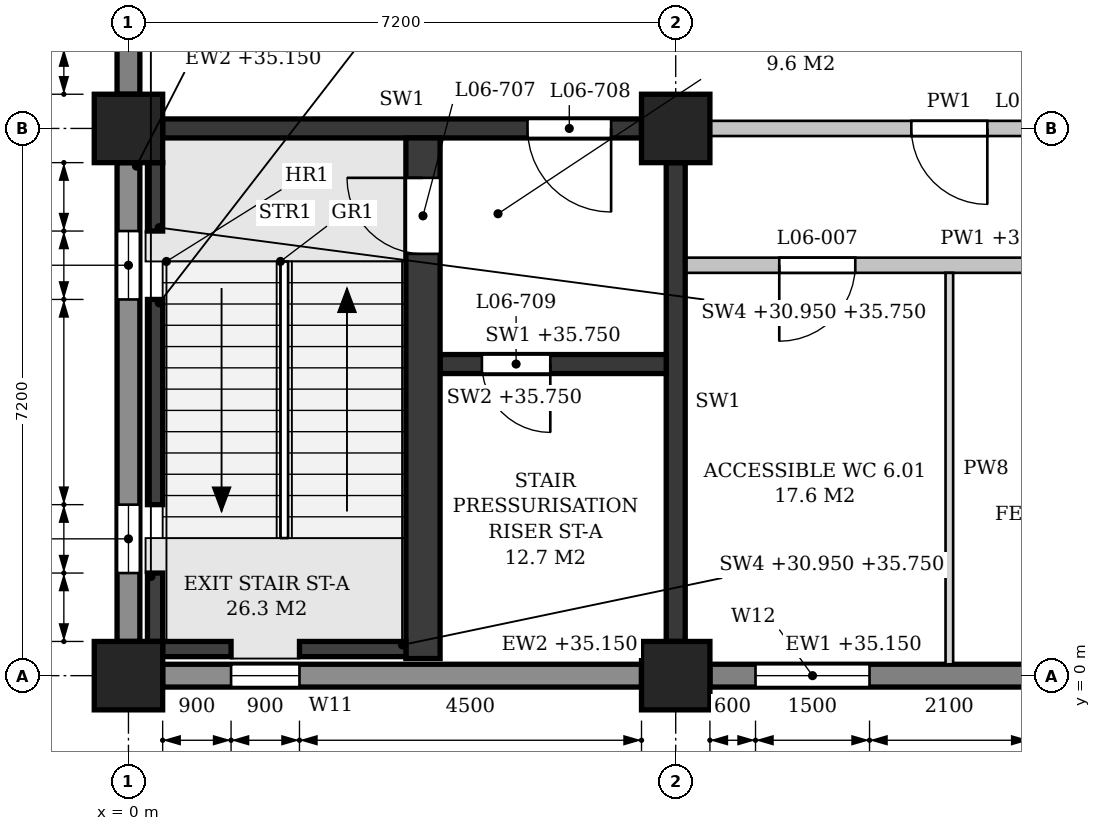
"""IFC4 building model, lengths in metres.
Left out: names, types, materials, properties, quantities, classifications, styles, units other than length and angle.
Written with IfcOpenShell. Run it as: python <this file> out.ifc"""

import sys

from ifc_helpers import new_model, si_unit, direction, frame, frame_2d, origin, origin_2d, place, context, subcontext, project, spatial, polyline, rectangle, outline, extrude, element, fill, save


model = new_model("IFC4")
c1 = context("Model", 3, precision=1e-05, world=origin(), true_north=direction((0.0, 1.0)))
c2 = subcontext(c1, "Body", "Model", "MODEL_VIEW")
j1 = project(units=[si_unit("LENGTHUNIT", "METRE"), si_unit("PLANEANGLEUNIT", "RADIAN")], contexts=[c1])
p1 = place(None, origin())
s1 = spatial("IfcSite", under=j1, at=p1, CompositionType="ELEMENT")
p2 = place(p1, origin())
s2 = spatial("IfcBuilding", under=s1, at=p2, CompositionType="ELEMENT")
p3 = place(p2, frame((0.0, 0.0, 31.2)))
s3 = spatial("IfcBuildingStorey", under=s2, at=p3, CompositionType="ELEMENT", Elevation=31.2)
for number, where, z_axis, x_axis in (
    (1, (0.0, 0.0, 0.0), (0.0, 0.0, 1.0), (1.0, 0.0, 0.0)),
    (2, (0.0, 7.2, 0.0), (0.0, 0.0, 1.0), (1.0, 0.0, 0.0)),
    (3, (7.2, 0.0, 0.0), (0.0, 0.0, 1.0), (1.0, 0.0, 0.0)),
    (4, (7.2, 7.2, 0.0), (0.0, 0.0, 1.0), (1.0, 0.0, 0.0)),
):
    element("IfcColumn", number, at=place(p3, frame(where, z_axis=z_axis, x_axis=x_axis)), inside=s3, PredefinedType="COLUMN", context=c2, shape_type="SweptSolid", body=[
        extrude(rectangle(XDim=0.9, YDim=0.9, at=origin_2d()), origin(), (0.0, 0.0, 1.0), 4.8),
    ])
p4 = place(p3, frame((0.0, 0.45, 0.0), z_axis=(0.0, 0.0, 1.0), x_axis=(0.0, 1.0, 0.0)))
e5 = element("IfcWall", 5, at=p4, inside=s3, PredefinedType="STANDARD", context=c2, shape_type="SweptSolid", body=[
    extrude(rectangle(XDim=6.3, YDim=0.3, at=frame_2d((3.15, 0.0))), origin(), (0.0, 0.0, 1.0), 3.95),
])
p5 = place(p4, frame((0.9, 0.0, 0.9)))
e6 = element("IfcOpeningElement", 6, at=p5, cuts=e5, PredefinedType="OPENING", context=c2, shape_type="SweptSolid", body=[
    extrude(outline(polyline([(0.0, 0.0), (0.9, 0.0), (0.9, 2.05), (0.45, 2.5), (0.0, 2.05), (0.0, 0.0)])), frame((0.0, 0.16, 0.0), z_axis=(0.0, -1.0, 0.0), x_axis=(1.0, 0.0, 0.0)), (0.0, 0.0, 1.0), 0.32),
])
p6 = place(p4, frame((4.5, 0.0, 0.9)))
e7 = element("IfcOpeningElement", 7, at=p6, cuts=e5, PredefinedType="OPENING", context=c2, shape_type="SweptSolid", body=[
    extrude(outline(polyline([(0.0, 0.0), (0.9, 0.0), (0.9, 2.05), (0.45, 2.5), (0.0, 2.05), (0.0, 0.0)])), frame((0.0, 0.16, 0.0), z_axis=(0.0, -1.0, 0.0), x_axis=(1.0, 0.0, 0.0)), (0.0, 0.0, 1.0), 0.32),
])
p7 = place(p3, frame((0.0, 7.65, 0.0), z_axis=(0.0, 0.0, 1.0), x_axis=(0.0, 1.0, 0.0)))
e8 = element("IfcWall", 8, at=p7, inside=s3, PredefinedType="STANDARD", context=c2, shape_type="SweptSolid", body=[
    extrude(rectangle(XDim=6.3, YDim=0.3, at=frame_2d((3.15, 0.0))), origin(), (0.0, 0.0, 1.0), 3.95),
])
p8 = place(p7, frame((0.6, 0.0, 0.9)))
e9 = element("IfcOpeningElement", 9, at=p8, cuts=e8, PredefinedType="OPENING", context=c2, shape_type="SweptSolid", body=[
    extrude(outline(polyline([(0.0, 0.0), (1.5, 0.0), (1.5, 1.75), (0.75, 2.5), (0.0, 1.75), (0.0, 0.0)])), frame((0.0, 0.16, 0.0), z_axis=(0.0, -1.0, 0.0), x_axis=(1.0, 0.0, 0.0)), (0.0, 0.0, 1.0), 0.32),
])
p9 = place(p7, frame((4.2, 0.0, 0.9)))
e10 = element("IfcOpeningElement", 10, at=p9, cuts=e8, PredefinedType="OPENING", context=c2, shape_type="SweptSolid", body=[
    extrude(outline(polyline([(0.0, 0.0), (1.5, 0.0), (1.5, 1.75), (0.75, 2.5), (0.0, 1.75), (0.0, 0.0)])), frame((0.0, 0.16, 0.0), z_axis=(0.0, -1.0, 0.0), x_axis=(1.0, 0.0, 0.0)), (0.0, 0.0, 1.0), 0.32),
])
p10 = place(p3, frame((0.45, 0.0, 0.0), z_axis=(0.0, 0.0, 1.0), x_axis=(1.0, 0.0, 0.0)))
e11 = element("IfcWall", 11, at=p10, inside=s3, PredefinedType="STANDARD", context=c2, shape_type="SweptSolid", body=[
    extrude(rectangle(XDim=6.3, YDim=0.3, at=frame_2d((3.15, 0.0))), origin(), (0.0, 0.0, 1.0), 3.95),
])
p11 = place(p10, frame((0.9, 0.0, 0.9)))
e12 = element("IfcOpeningElement", 12, at=p11, cuts=e11, PredefinedType="OPENING", context=c2, shape_type="SweptSolid", body=[
    extrude(outline(polyline([(0.0, 0.0), (0.9, 0.0), (0.9, 2.05), (0.45, 2.5), (0.0, 2.05), (0.0, 0.0)])), frame((0.0, 0.16, 0.0), z_axis=(0.0, -1.0, 0.0), x_axis=(1.0, 0.0, 0.0)), (0.0, 0.0, 1.0), 0.32),
])
p12 = place(p3, frame((7.65, 0.0, 0.0), z_axis=(0.0, 0.0, 1.0), x_axis=(1.0, 0.0, 0.0)))
e13 = element("IfcWall", 13, at=p12, inside=s3, PredefinedType="STANDARD", context=c2, shape_type="SweptSolid", body=[
    extrude(rectangle(XDim=6.3, YDim=0.3, at=frame_2d((3.15, 0.0))), origin(), (0.0, 0.0, 1.0), 3.95),
])
p13 = place(p12, frame((0.6, 0.0, 0.9)))
e14 = element("IfcOpeningElement", 14, at=p13, cuts=e13, PredefinedType="OPENING", context=c2, shape_type="SweptSolid", body=[
    extrude(outline(polyline([(0.0, 0.0), (1.5, 0.0), (1.5, 1.75), (0.75, 2.5), (0.0, 1.75), (0.0, 0.0)])), frame((0.0, 0.16, 0.0), z_axis=(0.0, -1.0, 0.0), x_axis=(1.0, 0.0, 0.0)), (0.0, 0.0, 1.0), 0.32),
])
p14 = place(p12, frame((4.2, 0.0, 0.9)))
e15 = element("IfcOpeningElement", 15, at=p14, cuts=e13, PredefinedType="OPENING", context=c2, shape_type="SweptSolid", body=[
    extrude(outline(polyline([(0.0, 0.0), (1.5, 0.0), (1.5, 1.75), (0.75, 2.5), (0.0, 1.75), (0.0, 0.0)])), frame((0.0, 0.16, 0.0), z_axis=(0.0, -1.0, 0.0), x_axis=(1.0, 0.0, 0.0)), (0.0, 0.0, 1.0), 0.32),
])
p15 = place(p3, frame((0.45, 7.2, 0.0), z_axis=(0.0, 0.0, 1.0), x_axis=(1.0, 0.0, 0.0)))
e16 = element("IfcWall", 16, at=p15, inside=s3, PredefinedType="SHEAR", context=c2, shape_type="SweptSolid", body=[
    extrude(rectangle(XDim=6.3, YDim=0.25, at=frame_2d((3.15, 0.0))), origin(), (0.0, 0.0, 1.0), 3.8),
])
p16 = place(p15, frame((4.8, 0.0, 0.0)))
e17 = element("IfcOpeningElement", 17, at=p16, cuts=e16, PredefinedType="OPENING", context=c2, shape_type="SweptSolid", body=[
    extrude(rectangle(XDim=1.1, YDim=2.1, at=frame_2d((0.55, 1.05))), frame((0.0, 0.135, 0.0), z_axis=(0.0, -1.0, 0.0), x_axis=(1.0, 0.0, 0.0)), (0.0, 0.0, 1.0), 0.27),
])
p17 = place(p3, frame((7.2, 0.45, 0.0), z_axis=(0.0, 0.0, 1.0), x_axis=(0.0, 1.0, 0.0)))
e18 = element("IfcWall", 18, at=p17, inside=s3, PredefinedType="SHEAR", context=c2, shape_type="SweptSolid", body=[
    extrude(rectangle(XDim=6.3, YDim=0.25, at=frame_2d((3.15, 0.0))), origin(), (0.0, 0.0, 1.0), 3.8),
])
p18 = place(p3, frame((0.35, 0.45, -0.25), z_axis=(0.0, 0.0, 1.0), x_axis=(0.0, 1.0, 0.0)))
e19 = element("IfcWall", 19, at=p18, inside=s3, PredefinedType="SHEAR", context=c2, shape_type="SweptSolid", body=[
    extrude(rectangle(XDim=0.9, YDim=0.2, at=frame_2d((0.45, 0.0))), origin(), (0.0, 0.0, 1.0), 4.8),
])
p19 = place(p3, frame((0.35, 2.25, -0.25), z_axis=(0.0, 0.0, 1.0), x_axis=(0.0, 1.0, 0.0)))
e20 = element("IfcWall", 20, at=p19, inside=s3, PredefinedType="SHEAR", context=c2, shape_type="SweptSolid", body=[
    extrude(rectangle(XDim=2.7, YDim=0.2, at=frame_2d((1.35, 0.0))), origin(), (0.0, 0.0, 1.0), 4.8),
])
p20 = place(p3, frame((0.35, 5.85, -0.25), z_axis=(0.0, 0.0, 1.0), x_axis=(0.0, 1.0, 0.0)))
e21 = element("IfcWall", 21, at=p20, inside=s3, PredefinedType="SHEAR", context=c2, shape_type="SweptSolid", body=[
    extrude(rectangle(XDim=0.9, YDim=0.2, at=frame_2d((0.45, 0.0))), origin(), (0.0, 0.0, 1.0), 4.8),
])
p21 = place(p3, frame((0.45, 0.35, -0.25), z_axis=(0.0, 0.0, 1.0), x_axis=(1.0, 0.0, 0.0)))
e22 = element("IfcWall", 22, at=p21, inside=s3, PredefinedType="SHEAR", context=c2, shape_type="SweptSolid", body=[
    extrude(rectangle(XDim=0.9, YDim=0.2, at=frame_2d((0.45, 0.0))), origin(), (0.0, 0.0, 1.0), 4.8),
])
p22 = place(p3, frame((2.25, 0.35, -0.25), z_axis=(0.0, 0.0, 1.0), x_axis=(1.0, 0.0, 0.0)))
e23 = element("IfcWall", 23, at=p22, inside=s3, PredefinedType="SHEAR", context=c2, shape_type="SweptSolid", body=[
    extrude(rectangle(XDim=1.4, YDim=0.2, at=frame_2d((0.7, 0.0))), origin(), (0.0, 0.0, 1.0), 4.8),
])
p23 = place(p3, frame((3.875, 0.225, 0.0), z_axis=(0.0, 0.0, 1.0), x_axis=(0.0, 1.0, 0.0)))
e24 = element("IfcWall", 24, at=p23, inside=s3, PredefinedType="SHEAR", context=c2, shape_type="SweptSolid", body=[
    extrude(rectangle(XDim=6.85, YDim=0.45, at=frame_2d((3.425, 0.0))), origin(), (0.0, 0.0, 1.0), 4.55),
])
p24 = place(p23, frame((5.325, 0.0, 0.0)))
e25 = element("IfcOpeningElement", 25, at=p24, cuts=e24, PredefinedType="OPENING", context=c2, shape_type="SweptSolid", body=[
    extrude(rectangle(XDim=1.0, YDim=2.1, at=frame_2d((0.5, 1.05))), frame((0.0, 0.235, 0.0), z_axis=(0.0, -1.0, 0.0), x_axis=(1.0, 0.0, 0.0)), (0.0, 0.0, 1.0), 0.47),
])
p25 = place(p3, frame((4.1, 4.1, 0.0), z_axis=(0.0, 0.0, 1.0), x_axis=(1.0, 0.0, 0.0)))
e26 = element("IfcWall", 26, at=p25, inside=s3, PredefinedType="SHEAR", context=c2, shape_type="SweptSolid", body=[
    extrude(rectangle(XDim=2.975, YDim=0.25, at=frame_2d((1.487, 0.0))), origin(), (0.0, 0.0, 1.0), 4.55),
])
p26 = place(p25, frame((0.55, 0.0, 0.0)))
e27 = element("IfcOpeningElement", 27, at=p26, cuts=e26, PredefinedType="OPENING", context=c2, shape_type="SweptSolid", body=[
    extrude(rectangle(XDim=0.9, YDim=2.1, at=frame_2d((0.45, 1.05))), frame((0.0, 0.135, 0.0), z_axis=(0.0, -1.0, 0.0), x_axis=(1.0, 0.0, 0.0)), (0.0, 0.0, 1.0), 0.27),
])
p27 = place(p3, frame((7.325, 5.4, 0.0), z_axis=(0.0, 0.0, 1.0), x_axis=(1.0, 0.0, 0.0)))
e28 = element("IfcWall", 28, at=p27, inside=s3, PredefinedType="PARTITIONING", context=c2, shape_type="SweptSolid", body=[
    extrude(outline(polyline([(0.0, 0.0), (14.15, 0.0), (14.15, 3.8), (14.025, 3.8), (14.025, 4.55), (7.325, 4.55), (7.325, 3.8), (6.825, 3.8), (6.825, 4.55), (0.125, 4.55), (0.125, 3.8), (0.0, 3.8), (0.0, 0.0)])), frame((0.0, 0.1, 0.0), z_axis=(0.0, -1.0, 0.0), x_axis=(1.0, 0.0, 0.0)), (0.0, 0.0, 1.0), 0.2),
])
p28 = place(p27, frame((1.238, 0.0, 0.0)))
e29 = element("IfcOpeningElement", 29, at=p28, cuts=e28, PredefinedType="OPENING", context=c2, shape_type="SweptSolid", body=[
    extrude(rectangle(XDim=1.0, YDim=2.1, at=frame_2d((0.5, 1.05))), frame((0.0, 0.11, 0.0), z_axis=(0.0, -1.0, 0.0), x_axis=(1.0, 0.0, 0.0)), (0.0, 0.0, 1.0), 0.22),
])
p29 = place(p27, frame((4.775, 0.0, 0.0)))
e30 = element("IfcOpeningElement", 30, at=p29, cuts=e28, PredefinedType="OPENING", context=c2, shape_type="SweptSolid", body=[
    extrude(rectangle(XDim=1.0, YDim=2.1, at=frame_2d((0.5, 1.05))), frame((0.0, 0.11, 0.0), z_axis=(0.0, -1.0, 0.0), x_axis=(1.0, 0.0, 0.0)), (0.0, 0.0, 1.0), 0.22),
])
p30 = place(p27, frame((8.375, 0.0, 0.0)))
e31 = element("IfcOpeningElement", 31, at=p30, cuts=e28, PredefinedType="OPENING", context=c2, shape_type="SweptSolid", body=[
    extrude(rectangle(XDim=1.0, YDim=2.1, at=frame_2d((0.5, 1.05))), frame((0.0, 0.11, 0.0), z_axis=(0.0, -1.0, 0.0), x_axis=(1.0, 0.0, 0.0)), (0.0, 0.0, 1.0), 0.22),
])
p31 = place(p27, frame((11.913, 0.0, 0.0)))
e32 = element("IfcOpeningElement", 32, at=p31, cuts=e28, PredefinedType="OPENING", context=c2, shape_type="SweptSolid", body=[
    extrude(rectangle(XDim=1.0, YDim=2.1, at=frame_2d((0.5, 1.05))), frame((0.0, 0.11, 0.0), z_axis=(0.0, -1.0, 0.0), x_axis=(1.0, 0.0, 0.0)), (0.0, 0.0, 1.0), 0.22),
])
p32 = place(p3, frame((7.65, 7.2, 0.0), z_axis=(0.0, 0.0, 1.0), x_axis=(1.0, 0.0, 0.0)))
e33 = element("IfcWall", 33, at=p32, inside=s3, PredefinedType="PARTITIONING", context=c2, shape_type="SweptSolid", body=[
    extrude(rectangle(XDim=6.3, YDim=0.2, at=frame_2d((3.15, 0.0))), origin(), (0.0, 0.0, 1.0), 3.8),
])
p33 = place(p32, frame((2.65, 0.0, 0.0)))
e34 = element("IfcOpeningElement", 34, at=p33, cuts=e33, PredefinedType="OPENING", context=c2, shape_type="SweptSolid", body=[
    extrude(rectangle(XDim=1.0, YDim=2.1, at=frame_2d((0.5, 1.05))), frame((0.0, 0.11, 0.0), z_axis=(0.0, -1.0, 0.0), x_axis=(1.0, 0.0, 0.0)), (0.0, 0.0, 1.0), 0.22),
])
p34 = place(p3, frame((10.8, 0.15, 0.0), z_axis=(0.0, 0.0, 1.0), x_axis=(0.0, 1.0, 0.0)))
e35 = element("IfcWall", 35, at=p34, inside=s3, PredefinedType="PARTITIONING", context=c2, shape_type="SweptSolid", body=[
    extrude(rectangle(XDim=5.15, YDim=0.1, at=frame_2d((2.575, 0.0))), origin(), (0.0, 0.0, 1.0), 3.8),
])
p35 = place(p11, origin())
e36 = element("IfcWindow", 36, at=p35, inside=s3, PartitioningType="SINGLE_PANEL", PredefinedType="WINDOW", context=c2, shape_type="SweptSolid", body=[
    extrude(outline(polyline([(0.0, 0.0), (0.9, 0.0), (0.9, 2.05), (0.45, 2.5), (0.0, 2.05), (0.0, 0.0)])), frame((0.0, 0.03, 0.0), z_axis=(0.0, -1.0, 0.0), x_axis=(1.0, 0.0, 0.0)), (0.0, 0.0, 1.0), 0.06),
])
fill(e12, e36)
p36 = place(p13, origin())
e37 = element("IfcWindow", 37, at=p36, inside=s3, PartitioningType="SINGLE_PANEL", PredefinedType="WINDOW", context=c2, shape_type="SweptSolid", body=[
    extrude(outline(polyline([(0.0, 0.0), (1.5, 0.0), (1.5, 1.75), (0.75, 2.5), (0.0, 1.75), (0.0, 0.0)])), frame((0.0, 0.03, 0.0), z_axis=(0.0, -1.0, 0.0), x_axis=(1.0, 0.0, 0.0)), (0.0, 0.0, 1.0), 0.06),
])
fill(e14, e37)
p37 = place(p5, origin())
e38 = element("IfcWindow", 38, at=p37, inside=s3, PartitioningType="SINGLE_PANEL", PredefinedType="WINDOW", context=c2, shape_type="SweptSolid", body=[
    extrude(outline(polyline([(0.0, 0.0), (0.9, 0.0), (0.9, 2.05), (0.45, 2.5), (0.0, 2.05), (0.0, 0.0)])), frame((0.0, 0.03, 0.0), z_axis=(0.0, -1.0, 0.0), x_axis=(1.0, 0.0, 0.0)), (0.0, 0.0, 1.0), 0.06),
])
fill(e6, e38)
p38 = place(p6, origin())
e39 = element("IfcWindow", 39, at=p38, inside=s3, PartitioningType="SINGLE_PANEL", PredefinedType="WINDOW", context=c2, shape_type="SweptSolid", body=[
    extrude(outline(polyline([(0.0, 0.0), (0.9, 0.0), (0.9, 2.05), (0.45, 2.5), (0.0, 2.05), (0.0, 0.0)])), frame((0.0, 0.03, 0.0), z_axis=(0.0, -1.0, 0.0), x_axis=(1.0, 0.0, 0.0)), (0.0, 0.0, 1.0), 0.06),
])
fill(e7, e39)
p39 = place(p24, origin())
e40 = element("IfcDoor", 40, at=p39, inside=s3, OperationType="SINGLE_SWING_RIGHT", PredefinedType="DOOR", context=c2, shape_type="SweptSolid", body=[
    extrude(rectangle(XDim=1.0, YDim=2.1, at=frame_2d((0.5, 1.05))), frame((0.0, 0.025, 0.0), z_axis=(0.0, -1.0, 0.0), x_axis=(1.0, 0.0, 0.0)), (0.0, 0.0, 1.0), 0.05),
])
fill(e25, e40)
p40 = place(p16, frame((1.1, 0.0, 0.0), z_axis=(0.0, 0.0, 1.0), x_axis=(-1.0, 0.0, 0.0)))
e41 = element("IfcDoor", 41, at=p40, inside=s3, OperationType="SINGLE_SWING_LEFT", PredefinedType="DOOR", context=c2, shape_type="SweptSolid", body=[
    extrude(rectangle(XDim=1.1, YDim=2.1, at=frame_2d((0.55, 1.05))), frame((0.0, 0.025, 0.0), z_axis=(0.0, -1.0, 0.0), x_axis=(1.0, 0.0, 0.0)), (0.0, 0.0, 1.0), 0.05),
])
fill(e17, e41)
p41 = place(p26, frame((0.9, 0.0, 0.0), z_axis=(0.0, 0.0, 1.0), x_axis=(-1.0, 0.0, 0.0)))
e42 = element("IfcDoor", 42, at=p41, inside=s3, OperationType="SINGLE_SWING_LEFT", PredefinedType="DOOR", context=c2, shape_type="SweptSolid", body=[
    extrude(rectangle(XDim=0.9, YDim=2.1, at=frame_2d((0.45, 1.05))), frame((0.0, 0.025, 0.0), z_axis=(0.0, -1.0, 0.0), x_axis=(1.0, 0.0, 0.0)), (0.0, 0.0, 1.0), 0.05),
])
fill(e27, e42)
p42 = place(p33, frame((1.0, 0.0, 0.0), z_axis=(0.0, 0.0, 1.0), x_axis=(-1.0, 0.0, 0.0)))
e43 = element("IfcDoor", 43, at=p42, inside=s3, OperationType="SINGLE_SWING_LEFT", PredefinedType="DOOR", context=c2, shape_type="SweptSolid", body=[
    extrude(rectangle(XDim=1.0, YDim=2.1, at=frame_2d((0.5, 1.05))), frame((0.0, 0.025, 0.0), z_axis=(0.0, -1.0, 0.0), x_axis=(1.0, 0.0, 0.0)), (0.0, 0.0, 1.0), 0.05),
])
fill(e34, e43)
p43 = place(p28, frame((1.0, 0.0, 0.0), z_axis=(0.0, 0.0, 1.0), x_axis=(-1.0, 0.0, 0.0)))
e44 = element("IfcDoor", 44, at=p43, inside=s3, OperationType="SINGLE_SWING_RIGHT", PredefinedType="DOOR", context=c2, shape_type="SweptSolid", body=[
    extrude(rectangle(XDim=1.0, YDim=2.1, at=frame_2d((0.5, 1.05))), frame((0.0, 0.025, 0.0), z_axis=(0.0, -1.0, 0.0), x_axis=(1.0, 0.0, 0.0)), (0.0, 0.0, 1.0), 0.05),
])
fill(e29, e44)
save(model, sys.argv[1])
